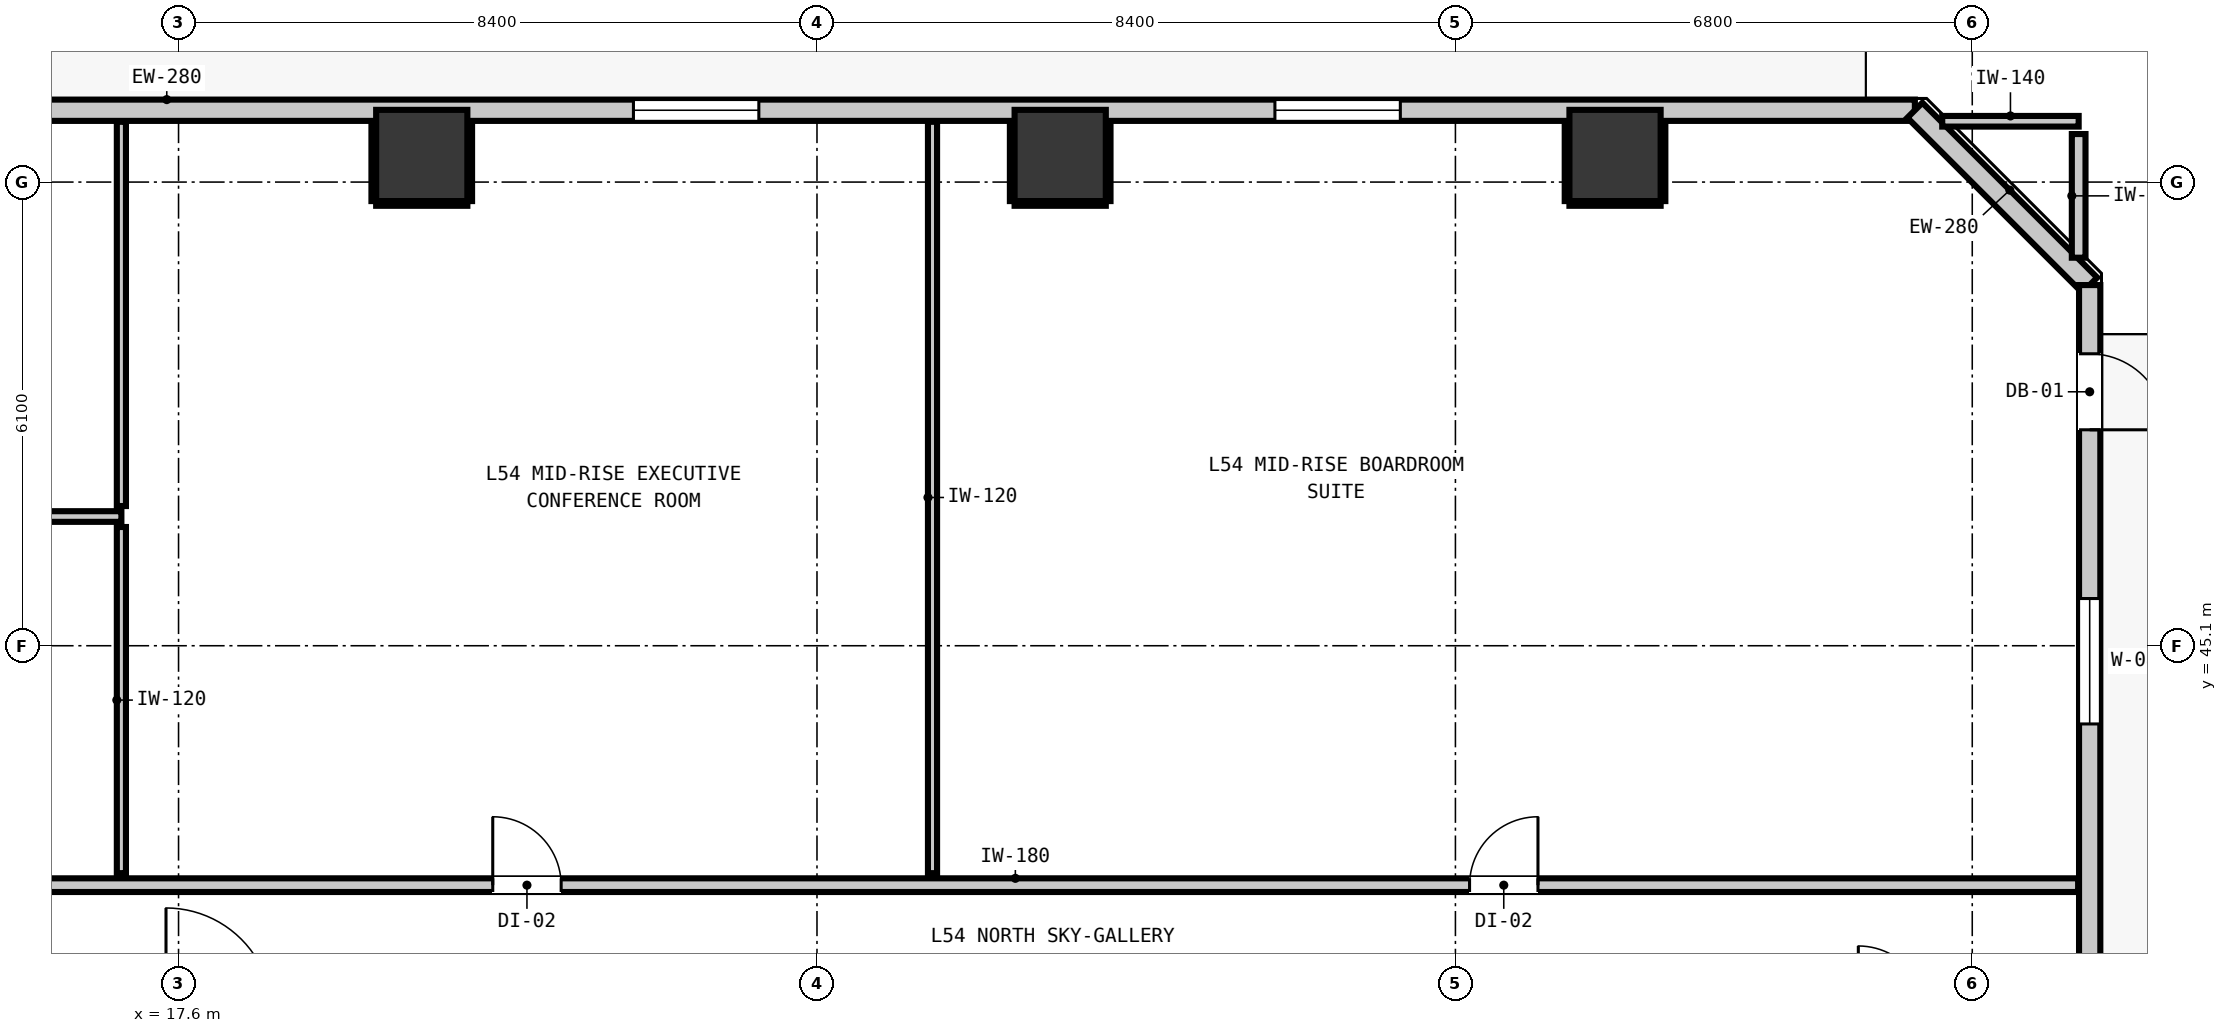
"""IFC4 building model, lengths in metres.
Left out: names, types, materials, properties, quantities, classifications, styles, units other than length and angle.
Written with IfcOpenShell. Run it as: python <this file> out.ifc"""

import sys

from ifc_helpers import new_model, si_unit, direction, frame, frame_2d, origin, origin_2d, place, context, subcontext, project, spatial, rectangle, extrude, element, fill, save


model = new_model("IFC4")
c1 = context("Model", 3, precision=1e-05, world=origin(), true_north=direction((0.0, 1.0)))
c2 = subcontext(c1, "Body", "Model", "MODEL_VIEW")
j1 = project(units=[si_unit("LENGTHUNIT", "METRE"), si_unit("PLANEANGLEUNIT", "RADIAN")], contexts=[c1])
p1 = place(None, origin())
s1 = spatial("IfcSite", under=j1, at=p1, CompositionType="ELEMENT")
p2 = place(p1, origin())
s2 = spatial("IfcBuilding", under=s1, at=p2, CompositionType="ELEMENT")
p3 = place(p2, frame((0.0, 0.0, 186.84)))
s3 = spatial("IfcBuildingStorey", under=s2, at=p3, CompositionType="ELEMENT", Elevation=186.84)
for number, where, z_axis, x_axis in (
    (1, (20.8, 51.55, 0.0), (0.0, 0.0, 1.0), (1.0, 0.0, 0.0)),
    (2, (29.2, 51.55, 0.0), (0.0, 0.0, 1.0), (1.0, 0.0, 0.0)),
    (3, (36.5, 51.55, 0.0), (0.0, 0.0, 1.0), (1.0, 0.0, 0.0)),
):
    element("IfcColumn", number, at=place(p3, frame(where, z_axis=z_axis, x_axis=x_axis)), inside=s3, PredefinedType="COLUMN", context=c2, shape_type="SweptSolid", body=[
        extrude(rectangle(XDim=1.2, YDim=1.2, at=origin_2d()), origin(), (0.0, 0.0, 1.0), 2.9),
    ])
p4 = place(p3, frame((5.355, 52.145, 0.0), z_axis=(0.0, 0.0, 1.0), x_axis=(1.0, 0.0, 0.0)))
e4 = element("IfcWall", 4, at=p4, inside=s3, PredefinedType="STANDARD", context=c2, shape_type="SweptSolid", body=[
    extrude(rectangle(XDim=35.09, YDim=0.28, at=frame_2d((17.545, 0.0))), origin(), (0.0, 0.0, 1.0), 2.9),
])
p5 = place(p4, frame((1.605, 0.0, 0.0)))
e5 = element("IfcOpeningElement", 5, at=p5, cuts=e4, PredefinedType="OPENING", context=c2, shape_type="SweptSolid", body=[
    extrude(rectangle(XDim=1.0, YDim=2.15, at=frame_2d((0.5, 1.075))), frame((0.0, 0.15, 0.0), z_axis=(0.0, -1.0, 0.0), x_axis=(1.0, 0.0, 0.0)), (0.0, 0.0, 1.0), 0.3),
])
p6 = place(p4, frame((4.3, 0.0, 0.85)))
e6 = element("IfcOpeningElement", 6, at=p6, cuts=e4, PredefinedType="OPENING", context=c2, shape_type="SweptSolid", body=[
    extrude(rectangle(XDim=1.65, YDim=1.75, at=frame_2d((0.825, 0.875))), frame((0.0, 0.15, 0.0), z_axis=(0.0, -1.0, 0.0), x_axis=(1.0, 0.0, 0.0)), (0.0, 0.0, 1.0), 0.3),
])
p7 = place(p4, frame((18.23, 0.0, 0.85)))
e7 = element("IfcOpeningElement", 7, at=p7, cuts=e4, PredefinedType="OPENING", context=c2, shape_type="SweptSolid", body=[
    extrude(rectangle(XDim=1.65, YDim=1.75, at=frame_2d((0.825, 0.875))), frame((0.0, 0.15, 0.0), z_axis=(0.0, -1.0, 0.0), x_axis=(1.0, 0.0, 0.0)), (0.0, 0.0, 1.0), 0.3),
])
p8 = place(p4, frame((26.67, 0.0, 0.85)))
e8 = element("IfcOpeningElement", 8, at=p8, cuts=e4, PredefinedType="OPENING", context=c2, shape_type="SweptSolid", body=[
    extrude(rectangle(XDim=1.65, YDim=1.75, at=frame_2d((0.825, 0.875))), frame((0.0, 0.15, 0.0), z_axis=(0.0, -1.0, 0.0), x_axis=(1.0, 0.0, 0.0)), (0.0, 0.0, 1.0), 0.3),
])
p9 = place(p3, frame((40.445, 52.145, 0.0), z_axis=(0.0, 0.0, 1.0), x_axis=(0.707106781187, -0.707106781187, 0.0)))
e9 = element("IfcWall", 9, at=p9, inside=s3, PredefinedType="STANDARD", context=c2, shape_type="SweptSolid", body=[
    extrude(rectangle(XDim=3.253, YDim=0.28, at=frame_2d((1.626, 0.0))), origin(), (0.0, 0.0, 1.0), 2.9),
])
p10 = place(p3, frame((42.745, 49.845, 0.0), z_axis=(0.0, 0.0, 1.0), x_axis=(0.0, -1.0, 0.0)))
e10 = element("IfcWall", 10, at=p10, inside=s3, PredefinedType="STANDARD", context=c2, shape_type="SweptSolid", body=[
    extrude(rectangle(XDim=32.29, YDim=0.28, at=frame_2d((16.145, 0.0))), origin(), (0.0, 0.0, 1.0), 2.9),
])
p11 = place(p10, frame((0.904, 0.0, 0.0)))
e11 = element("IfcOpeningElement", 11, at=p11, cuts=e10, PredefinedType="OPENING", context=c2, shape_type="SweptSolid", body=[
    extrude(rectangle(XDim=1.0, YDim=2.15, at=frame_2d((0.5, 1.075))), frame((0.0, 0.15, 0.0), z_axis=(0.0, -1.0, 0.0), x_axis=(1.0, 0.0, 0.0)), (0.0, 0.0, 1.0), 0.3),
])
p12 = place(p10, frame((30.822, 0.0, 0.85)))
e12 = element("IfcOpeningElement", 12, at=p12, cuts=e10, PredefinedType="OPENING", context=c2, shape_type="SweptSolid", body=[
    extrude(rectangle(XDim=1.05, YDim=1.65, at=frame_2d((0.525, 0.825))), frame((0.0, 0.15, 0.0), z_axis=(0.0, -1.0, 0.0), x_axis=(1.0, 0.0, 0.0)), (0.0, 0.0, 1.0), 0.3),
])
p13 = place(p10, frame((4.124, 0.0, 0.85)))
e13 = element("IfcOpeningElement", 13, at=p13, cuts=e10, PredefinedType="OPENING", context=c2, shape_type="SweptSolid", body=[
    extrude(rectangle(XDim=1.65, YDim=1.75, at=frame_2d((0.825, 0.875))), frame((0.0, 0.15, 0.0), z_axis=(0.0, -1.0, 0.0), x_axis=(1.0, 0.0, 0.0)), (0.0, 0.0, 1.0), 0.3),
])
p14 = place(p10, frame((24.424, 0.0, 0.85)))
e14 = element("IfcOpeningElement", 14, at=p14, cuts=e10, PredefinedType="OPENING", context=c2, shape_type="SweptSolid", body=[
    extrude(rectangle(XDim=1.65, YDim=1.75, at=frame_2d((0.825, 0.875))), frame((0.0, 0.15, 0.0), z_axis=(0.0, -1.0, 0.0), x_axis=(1.0, 0.0, 0.0)), (0.0, 0.0, 1.0), 0.3),
])
p15 = place(p3, frame((3.207, 41.95, 0.0), z_axis=(0.0, 0.0, 1.0), x_axis=(1.0, 0.0, 0.0)))
e15 = element("IfcWall", 15, at=p15, inside=s3, PredefinedType="PARTITIONING", context=c2, shape_type="SweptSolid", body=[
    extrude(rectangle(XDim=39.386, YDim=0.18, at=frame_2d((19.693, 0.0))), origin(), (0.0, 0.0, 1.0), 2.9),
])
p16 = place(p15, frame((7.817, 0.0, 0.0)))
e16 = element("IfcOpeningElement", 16, at=p16, cuts=e15, PredefinedType="OPENING", context=c2, shape_type="SweptSolid", body=[
    extrude(rectangle(XDim=1.0, YDim=2.15, at=frame_2d((0.5, 1.075))), frame((0.0, 0.1, 0.0), z_axis=(0.0, -1.0, 0.0), x_axis=(1.0, 0.0, 0.0)), (0.0, 0.0, 1.0), 0.2),
])
p17 = place(p15, frame((18.527, 0.0, 0.0)))
e17 = element("IfcOpeningElement", 17, at=p17, cuts=e15, PredefinedType="OPENING", context=c2, shape_type="SweptSolid", body=[
    extrude(rectangle(XDim=0.9, YDim=2.1, at=frame_2d((0.45, 1.05))), frame((0.0, 0.1, 0.0), z_axis=(0.0, -1.0, 0.0), x_axis=(1.0, 0.0, 0.0)), (0.0, 0.0, 1.0), 0.2),
])
p18 = place(p15, frame((31.379, 0.0, 0.0)))
e18 = element("IfcOpeningElement", 18, at=p18, cuts=e15, PredefinedType="OPENING", context=c2, shape_type="SweptSolid", body=[
    extrude(rectangle(XDim=0.9, YDim=2.1, at=frame_2d((0.45, 1.05))), frame((0.0, 0.1, 0.0), z_axis=(0.0, -1.0, 0.0), x_axis=(1.0, 0.0, 0.0)), (0.0, 0.0, 1.0), 0.2),
])
p19 = place(p3, frame((3.207, 46.8, 0.0), z_axis=(0.0, 0.0, 1.0), x_axis=(1.0, 0.0, 0.0)))
e19 = element("IfcWall", 19, at=p19, inside=s3, PredefinedType="PARTITIONING", context=c2, shape_type="SweptSolid", body=[
    extrude(rectangle(XDim=13.641, YDim=0.14, at=frame_2d((6.82, 0.0))), origin(), (0.0, 0.0, 1.0), 2.9),
])
p20 = place(p19, frame((7.867, 0.0, 0.0)))
e20 = element("IfcOpeningElement", 20, at=p20, cuts=e19, PredefinedType="OPENING", context=c2, shape_type="SweptSolid", body=[
    extrude(rectangle(XDim=0.9, YDim=2.1, at=frame_2d((0.45, 1.05))), frame((0.0, 0.08, 0.0), z_axis=(0.0, -1.0, 0.0), x_axis=(1.0, 0.0, 0.0)), (0.0, 0.0, 1.0), 0.16),
])
p21 = place(p3, frame((40.805, 52.0, 0.0), z_axis=(0.0, 0.0, 1.0), x_axis=(1.0, 0.0, 0.0)))
e21 = element("IfcWall", 21, at=p21, inside=s3, PredefinedType="PARTITIONING", context=c2, shape_type="SweptSolid", body=[
    extrude(rectangle(XDim=1.795, YDim=0.14, at=frame_2d((0.897, 0.0))), origin(), (0.0, 0.0, 1.0), 2.9),
])
p22 = place(p3, frame((42.6, 50.205, 0.0), z_axis=(0.0, 0.0, 1.0), x_axis=(0.0, 1.0, 0.0)))
e22 = element("IfcWall", 22, at=p22, inside=s3, PredefinedType="PARTITIONING", context=c2, shape_type="SweptSolid", body=[
    extrude(rectangle(XDim=1.627, YDim=0.18, at=frame_2d((0.813, 0.0))), origin(), (0.0, 0.0, 1.0), 2.9),
])
p23 = place(p3, frame((16.848, 42.108, 0.0), z_axis=(0.0, 0.0, 1.0), x_axis=(0.0, 1.0, 0.0)))
e23 = element("IfcWall", 23, at=p23, inside=s3, PredefinedType="PARTITIONING", context=c2, shape_type="SweptSolid", body=[
    extrude(rectangle(XDim=4.554, YDim=0.12, at=frame_2d((2.277, 0.0))), origin(), (0.0, 0.0, 1.0), 2.9),
])
p24 = place(p3, frame((16.848, 46.938, 0.0), z_axis=(0.0, 0.0, 1.0), x_axis=(0.0, 1.0, 0.0)))
e24 = element("IfcWall", 24, at=p24, inside=s3, PredefinedType="PARTITIONING", context=c2, shape_type="SweptSolid", body=[
    extrude(rectangle(XDim=5.055, YDim=0.12, at=frame_2d((2.527, 0.0))), origin(), (0.0, 0.0, 1.0), 2.9),
])
p25 = place(p3, frame((27.52, 42.108, 0.0), z_axis=(0.0, 0.0, 1.0), x_axis=(0.0, 1.0, 0.0)))
e25 = element("IfcWall", 25, at=p25, inside=s3, PredefinedType="PARTITIONING", context=c2, shape_type="SweptSolid", body=[
    extrude(rectangle(XDim=9.885, YDim=0.12, at=frame_2d((4.942, 0.0))), origin(), (0.0, 0.0, 1.0), 2.9),
])
p26 = place(p3, frame((20.2, 50.918, 0.0), z_axis=(0.0, 0.0, 1.0), x_axis=(1.0, 0.0, 0.0)))
e26 = element("IfcWall", 26, at=p26, inside=s3, PredefinedType="PARTITIONING", context=c2, shape_type="SweptSolid", body=[
    extrude(rectangle(XDim=1.2, YDim=0.06, at=frame_2d((0.6, 0.0))), origin(), (0.0, 0.0, 1.0), 1.45),
])
for number, where, z_axis, x_axis in (
    (27, (20.168, 50.95, 0.0), (0.0, 0.0, 1.0), (0.0, 1.0, 0.0)),
    (28, (21.432, 50.95, 0.0), (0.0, 0.0, 1.0), (0.0, 1.0, 0.0)),
):
    element("IfcWall", number, at=place(p3, frame(where, z_axis=z_axis, x_axis=x_axis)), inside=s3, PredefinedType="PARTITIONING", context=c2, shape_type="SweptSolid", body=[
        extrude(rectangle(XDim=1.04, YDim=0.06, at=frame_2d((0.52, 0.0))), origin(), (0.0, 0.0, 1.0), 0.905),
    ])
p27 = place(p3, frame((28.6, 50.918, 0.0), z_axis=(0.0, 0.0, 1.0), x_axis=(1.0, 0.0, 0.0)))
e29 = element("IfcWall", 29, at=p27, inside=s3, PredefinedType="PARTITIONING", context=c2, shape_type="SweptSolid", body=[
    extrude(rectangle(XDim=1.2, YDim=0.06, at=frame_2d((0.6, 0.0))), origin(), (0.0, 0.0, 1.0), 1.45),
])
for number, where, z_axis, x_axis in (
    (30, (28.568, 50.95, 0.0), (0.0, 0.0, 1.0), (0.0, 1.0, 0.0)),
    (31, (29.832, 50.95, 0.0), (0.0, 0.0, 1.0), (0.0, 1.0, 0.0)),
):
    element("IfcWall", number, at=place(p3, frame(where, z_axis=z_axis, x_axis=x_axis)), inside=s3, PredefinedType="PARTITIONING", context=c2, shape_type="SweptSolid", body=[
        extrude(rectangle(XDim=1.04, YDim=0.06, at=frame_2d((0.52, 0.0))), origin(), (0.0, 0.0, 1.0), 0.905),
    ])
p28 = place(p3, frame((35.9, 50.918, 0.0), z_axis=(0.0, 0.0, 1.0), x_axis=(1.0, 0.0, 0.0)))
e32 = element("IfcWall", 32, at=p28, inside=s3, PredefinedType="PARTITIONING", context=c2, shape_type="SweptSolid", body=[
    extrude(rectangle(XDim=1.2, YDim=0.06, at=frame_2d((0.6, 0.0))), origin(), (0.0, 0.0, 1.0), 1.45),
])
for number, where, z_axis, x_axis in (
    (33, (35.868, 50.95, 0.0), (0.0, 0.0, 1.0), (0.0, 1.0, 0.0)),
    (34, (37.132, 50.95, 0.0), (0.0, 0.0, 1.0), (0.0, 1.0, 0.0)),
):
    element("IfcWall", number, at=place(p3, frame(where, z_axis=z_axis, x_axis=x_axis)), inside=s3, PredefinedType="PARTITIONING", context=c2, shape_type="SweptSolid", body=[
        extrude(rectangle(XDim=1.04, YDim=0.06, at=frame_2d((0.52, 0.0))), origin(), (0.0, 0.0, 1.0), 0.905),
    ])
p29 = place(p11, origin())
e35 = element("IfcDoor", 35, at=p29, inside=s3, OperationType="SINGLE_SWING_RIGHT", PredefinedType="DOOR", context=c2, shape_type="SweptSolid", body=[
    extrude(rectangle(XDim=1.0, YDim=2.15, at=frame_2d((0.5, 1.075))), frame((0.0, 0.025, 0.0), z_axis=(0.0, -1.0, 0.0), x_axis=(1.0, 0.0, 0.0)), (0.0, 0.0, 1.0), 0.05),
])
fill(e11, e35)
p30 = place(p7, origin())
e36 = element("IfcWindow", 36, at=p30, inside=s3, PartitioningType="SINGLE_PANEL", PredefinedType="WINDOW", context=c2, shape_type="SweptSolid", body=[
    extrude(rectangle(XDim=1.65, YDim=1.75, at=frame_2d((0.825, 0.875))), frame((0.0, 0.03, 0.0), z_axis=(0.0, -1.0, 0.0), x_axis=(1.0, 0.0, 0.0)), (0.0, 0.0, 1.0), 0.06),
])
fill(e7, e36)
p31 = place(p8, origin())
e37 = element("IfcWindow", 37, at=p31, inside=s3, PartitioningType="SINGLE_PANEL", PredefinedType="WINDOW", context=c2, shape_type="SweptSolid", body=[
    extrude(rectangle(XDim=1.65, YDim=1.75, at=frame_2d((0.825, 0.875))), frame((0.0, 0.03, 0.0), z_axis=(0.0, -1.0, 0.0), x_axis=(1.0, 0.0, 0.0)), (0.0, 0.0, 1.0), 0.06),
])
fill(e8, e37)
p32 = place(p13, origin())
e38 = element("IfcWindow", 38, at=p32, inside=s3, PartitioningType="SINGLE_PANEL", PredefinedType="WINDOW", context=c2, shape_type="SweptSolid", body=[
    extrude(rectangle(XDim=1.65, YDim=1.75, at=frame_2d((0.825, 0.875))), frame((0.0, 0.03, 0.0), z_axis=(0.0, -1.0, 0.0), x_axis=(1.0, 0.0, 0.0)), (0.0, 0.0, 1.0), 0.06),
])
fill(e13, e38)
p33 = place(p17, origin())
e39 = element("IfcDoor", 39, at=p33, inside=s3, OperationType="SINGLE_SWING_LEFT", PredefinedType="DOOR", context=c2, shape_type="SweptSolid", body=[
    extrude(rectangle(XDim=0.9, YDim=2.1, at=frame_2d((0.45, 1.05))), frame((0.0, 0.025, 0.0), z_axis=(0.0, -1.0, 0.0), x_axis=(1.0, 0.0, 0.0)), (0.0, 0.0, 1.0), 0.05),
])
fill(e17, e39)
p34 = place(p18, origin())
e40 = element("IfcDoor", 40, at=p34, inside=s3, OperationType="SINGLE_SWING_RIGHT", PredefinedType="DOOR", context=c2, shape_type="SweptSolid", body=[
    extrude(rectangle(XDim=0.9, YDim=2.1, at=frame_2d((0.45, 1.05))), frame((0.0, 0.025, 0.0), z_axis=(0.0, -1.0, 0.0), x_axis=(1.0, 0.0, 0.0)), (0.0, 0.0, 1.0), 0.05),
])
fill(e18, e40)
save(model, sys.argv[1])
